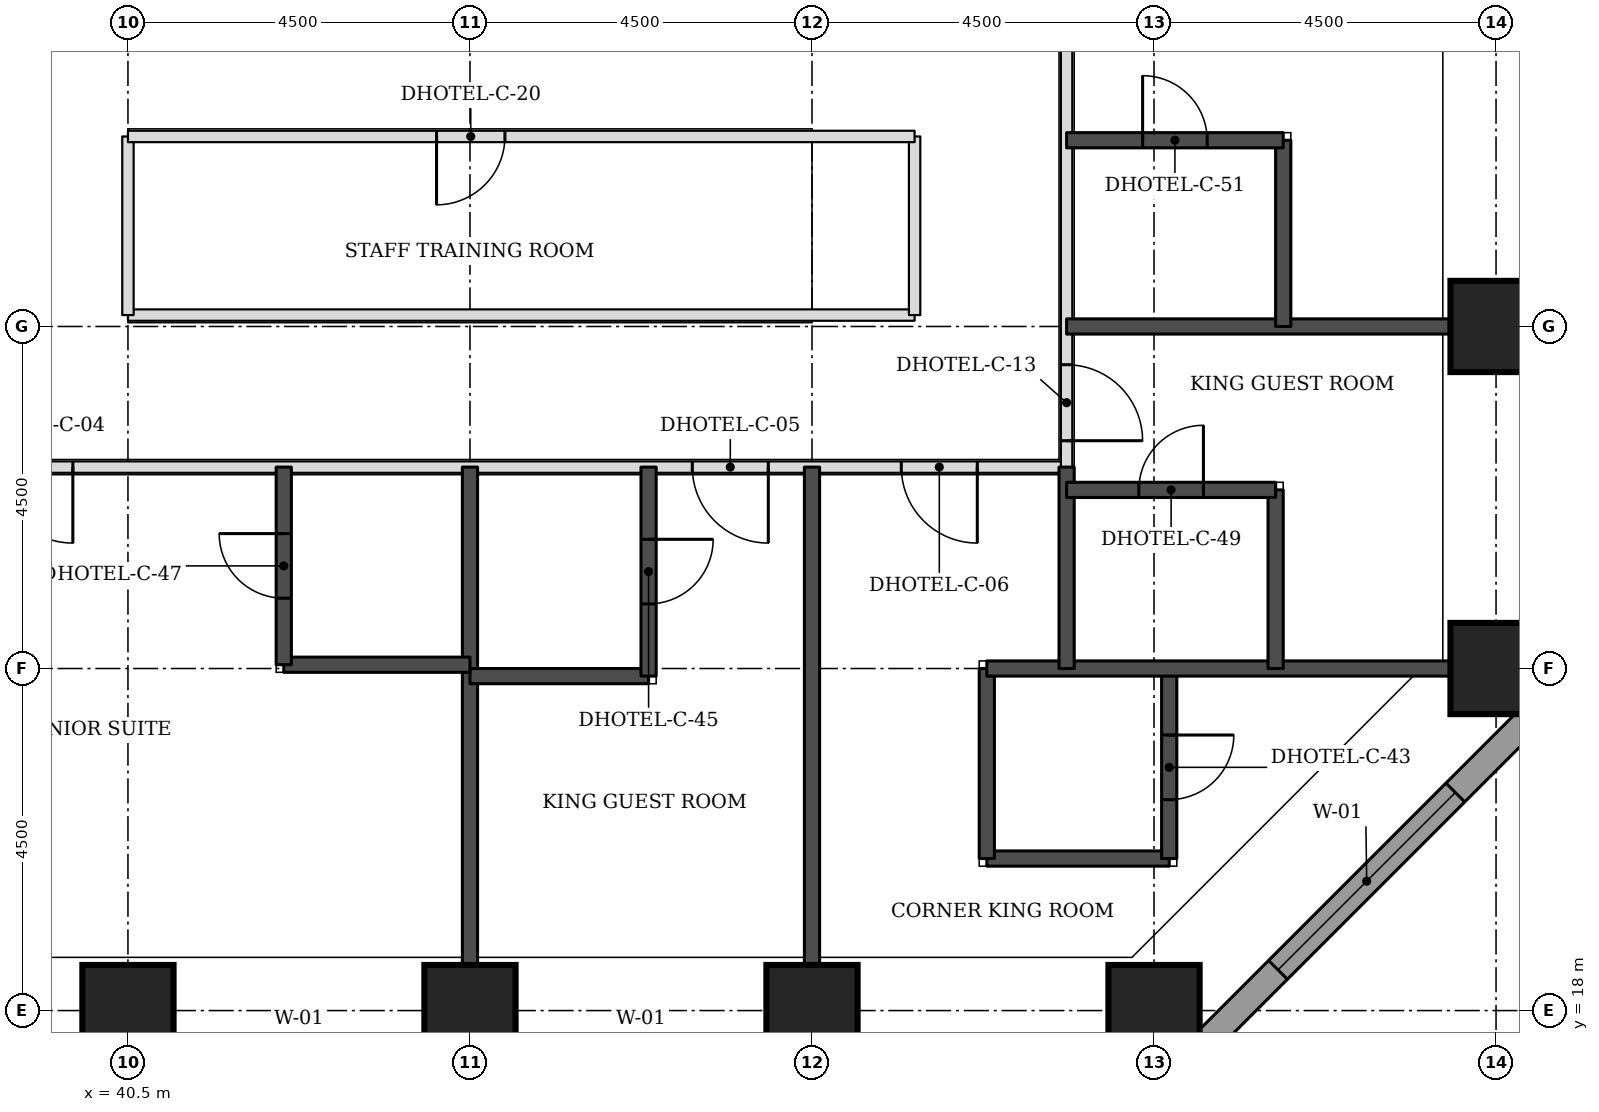
"""IFC4 building model, lengths in metres.
Left out: names, types, materials, properties, quantities, classifications, styles, units other than length and angle.
Written with IfcOpenShell. Run it as: python <this file> out.ifc"""

import sys

from ifc_helpers import new_model, si_unit, direction, frame, frame_2d, origin, origin_2d, place, context, subcontext, project, spatial, rectangle, extrude, element, fill, save


model = new_model("IFC4")
c1 = context("Model", 3, precision=1e-05, world=origin(), true_north=direction((0.0, 1.0)))
c2 = subcontext(c1, "Body", "Model", "MODEL_VIEW")
j1 = project(units=[si_unit("LENGTHUNIT", "METRE"), si_unit("PLANEANGLEUNIT", "RADIAN")], contexts=[c1])
p1 = place(None, origin())
s1 = spatial("IfcSite", under=j1, at=p1, CompositionType="ELEMENT")
p2 = place(p1, origin())
s2 = spatial("IfcBuilding", under=s1, at=p2, CompositionType="ELEMENT")
p3 = place(p2, frame((0.0, 0.0, 33.0)))
s3 = spatial("IfcBuildingStorey", under=s2, at=p3, CompositionType="ELEMENT", Elevation=33.0)
for number, where, z_axis, x_axis in (
    (1, (40.5, 18.0, 0.0), (0.0, 0.0, 1.0), (1.0, 0.0, 0.0)),
    (2, (45.0, 18.0, 0.0), (0.0, 0.0, 1.0), (1.0, 0.0, 0.0)),
    (3, (49.5, 18.0, 0.0), (0.0, 0.0, 1.0), (1.0, 0.0, 0.0)),
    (4, (54.0, 18.0, 0.0), (0.0, 0.0, 1.0), (1.0, 0.0, 0.0)),
    (5, (58.5, 22.5, 0.0), (0.0, 0.0, 1.0), (1.0, 0.0, 0.0)),
    (6, (58.5, 27.0, 0.0), (0.0, 0.0, 1.0), (1.0, 0.0, 0.0)),
):
    element("IfcColumn", number, at=place(p3, frame(where, z_axis=z_axis, x_axis=x_axis)), inside=s3, PredefinedType="COLUMN", context=c2, shape_type="SweptSolid", body=[
        extrude(rectangle(XDim=1.2, YDim=1.2, at=origin_2d()), origin(), (0.0, 0.0, 1.0), 3.3),
    ])
p4 = place(p3, frame((54.27, 17.174, 0.0), z_axis=(0.0, 0.0, 1.0), x_axis=(0.707106781187, 0.707106781187, 0.0)))
e7 = element("IfcWall", 7, at=p4, inside=s3, PredefinedType="STANDARD", context=c2, shape_type="SweptSolid", body=[
    extrude(rectangle(XDim=7.151, YDim=0.35, at=frame_2d((3.576, 0.0))), origin(), (0.0, 0.0, 1.0), 3.055),
])
p5 = place(p4, frame((1.926, 0.0, 0.8)))
e8 = element("IfcOpeningElement", 8, at=p5, cuts=e7, PredefinedType="OPENING", context=c2, shape_type="SweptSolid", body=[
    extrude(rectangle(XDim=3.3, YDim=1.5, at=frame_2d((1.65, 0.75))), frame((0.0, 0.185, 0.0), z_axis=(0.0, -1.0, 0.0), x_axis=(1.0, 0.0, 0.0)), (0.0, 0.0, 1.0), 0.37),
])
p6 = place(p3, frame((19.15, 25.15, 0.0), z_axis=(0.0, 0.0, 1.0), x_axis=(1.0, 0.0, 0.0)))
e9 = element("IfcWall", 9, at=p6, inside=s3, PredefinedType="PARTITIONING", context=c2, shape_type="SweptSolid", body=[
    extrude(rectangle(XDim=33.7, YDim=0.15, at=frame_2d((16.85, 0.0))), origin(), (0.0, 0.0, 1.0), 3.08),
])
p7 = place(p6, frame((4.175, 0.0, 0.0)))
e10 = element("IfcOpeningElement", 10, at=p7, cuts=e9, PredefinedType="OPENING", context=c2, shape_type="SweptSolid", body=[
    extrude(rectangle(XDim=1.0, YDim=2.1, at=frame_2d((0.5, 1.05))), frame((0.0, 0.085, 0.0), z_axis=(0.0, -1.0, 0.0), x_axis=(1.0, 0.0, 0.0)), (0.0, 0.0, 1.0), 0.17),
])
p8 = place(p6, frame((13.325, 0.0, 0.0)))
e11 = element("IfcOpeningElement", 11, at=p8, cuts=e9, PredefinedType="OPENING", context=c2, shape_type="SweptSolid", body=[
    extrude(rectangle(XDim=1.0, YDim=2.1, at=frame_2d((0.5, 1.05))), frame((0.0, 0.085, 0.0), z_axis=(0.0, -1.0, 0.0), x_axis=(1.0, 0.0, 0.0)), (0.0, 0.0, 1.0), 0.17),
])
p9 = place(p6, frame((19.625, 0.0, 0.0)))
e12 = element("IfcOpeningElement", 12, at=p9, cuts=e9, PredefinedType="OPENING", context=c2, shape_type="SweptSolid", body=[
    extrude(rectangle(XDim=1.0, YDim=2.1, at=frame_2d((0.5, 1.05))), frame((0.0, 0.085, 0.0), z_axis=(0.0, -1.0, 0.0), x_axis=(1.0, 0.0, 0.0)), (0.0, 0.0, 1.0), 0.17),
])
p10 = place(p6, frame((28.775, 0.0, 0.0)))
e13 = element("IfcOpeningElement", 13, at=p10, cuts=e9, PredefinedType="OPENING", context=c2, shape_type="SweptSolid", body=[
    extrude(rectangle(XDim=1.0, YDim=2.1, at=frame_2d((0.5, 1.05))), frame((0.0, 0.085, 0.0), z_axis=(0.0, -1.0, 0.0), x_axis=(1.0, 0.0, 0.0)), (0.0, 0.0, 1.0), 0.17),
])
p11 = place(p6, frame((1.175, 0.0, 0.0)))
e14 = element("IfcOpeningElement", 14, at=p11, cuts=e9, PredefinedType="OPENING", context=c2, shape_type="SweptSolid", body=[
    extrude(rectangle(XDim=1.0, YDim=2.1, at=frame_2d((0.5, 1.05))), frame((0.0, 0.085, 0.0), z_axis=(0.0, -1.0, 0.0), x_axis=(1.0, 0.0, 0.0)), (0.0, 0.0, 1.0), 0.17),
])
p12 = place(p6, frame((31.525, 0.0, 0.0)))
e15 = element("IfcOpeningElement", 15, at=p12, cuts=e9, PredefinedType="OPENING", context=c2, shape_type="SweptSolid", body=[
    extrude(rectangle(XDim=1.0, YDim=2.1, at=frame_2d((0.5, 1.05))), frame((0.0, 0.085, 0.0), z_axis=(0.0, -1.0, 0.0), x_axis=(1.0, 0.0, 0.0)), (0.0, 0.0, 1.0), 0.17),
])
p13 = place(p3, frame((52.85, 25.15, 0.0), z_axis=(0.0, 0.0, 1.0), x_axis=(0.0, 1.0, 0.0)))
e16 = element("IfcWall", 16, at=p13, inside=s3, PredefinedType="PARTITIONING", context=c2, shape_type="SweptSolid", body=[
    extrude(rectangle(XDim=22.35, YDim=0.15, at=frame_2d((11.175, 0.0))), origin(), (0.0, 0.0, 1.0), 3.08),
])
p14 = place(p13, frame((0.347, 0.0, 0.0)))
e17 = element("IfcOpeningElement", 17, at=p14, cuts=e16, PredefinedType="OPENING", context=c2, shape_type="SweptSolid", body=[
    extrude(rectangle(XDim=1.0, YDim=2.1, at=frame_2d((0.5, 1.05))), frame((0.0, 0.085, 0.0), z_axis=(0.0, -1.0, 0.0), x_axis=(1.0, 0.0, 0.0)), (0.0, 0.0, 1.0), 0.17),
])
p15 = place(p13, frame((7.075, 0.0, 0.0)))
e18 = element("IfcOpeningElement", 18, at=p15, cuts=e16, PredefinedType="OPENING", context=c2, shape_type="SweptSolid", body=[
    extrude(rectangle(XDim=1.0, YDim=2.1, at=frame_2d((0.5, 1.05))), frame((0.0, 0.085, 0.0), z_axis=(0.0, -1.0, 0.0), x_axis=(1.0, 0.0, 0.0)), (0.0, 0.0, 1.0), 0.17),
])
p16 = place(p13, frame((11.425, 0.0, 0.0)))
e19 = element("IfcOpeningElement", 19, at=p16, cuts=e16, PredefinedType="OPENING", context=c2, shape_type="SweptSolid", body=[
    extrude(rectangle(XDim=1.0, YDim=2.1, at=frame_2d((0.5, 1.05))), frame((0.0, 0.085, 0.0), z_axis=(0.0, -1.0, 0.0), x_axis=(1.0, 0.0, 0.0)), (0.0, 0.0, 1.0), 0.17),
])
p17 = place(p13, frame((17.15, 0.0, 0.0)))
e20 = element("IfcOpeningElement", 20, at=p17, cuts=e16, PredefinedType="OPENING", context=c2, shape_type="SweptSolid", body=[
    extrude(rectangle(XDim=0.9, YDim=2.1, at=frame_2d((0.45, 1.05))), frame((0.0, 0.085, 0.0), z_axis=(0.0, -1.0, 0.0), x_axis=(1.0, 0.0, 0.0)), (0.0, 0.0, 1.0), 0.17),
])
p18 = place(p3, frame((40.5, 27.15, 0.0), z_axis=(0.0, 0.0, 1.0), x_axis=(1.0, 0.0, 0.0)))
e21 = element("IfcWall", 21, at=p18, inside=s3, PredefinedType="PARTITIONING", context=c2, shape_type="SweptSolid", body=[
    extrude(rectangle(XDim=10.35, YDim=0.15, at=frame_2d((5.175, 0.0))), origin(), (0.0, 0.0, 1.0), 3.08),
])
for number, where, z_axis, x_axis in (
    (22, (40.5, 27.15, 0.0), (0.0, 0.0, 1.0), (0.0, 1.0, 0.0)),
    (23, (50.85, 27.15, 0.0), (0.0, 0.0, 1.0), (0.0, 1.0, 0.0)),
):
    element("IfcWall", number, at=place(p3, frame(where, z_axis=z_axis, x_axis=x_axis)), inside=s3, PredefinedType="PARTITIONING", context=c2, shape_type="SweptSolid", body=[
        extrude(rectangle(XDim=2.35, YDim=0.15, at=frame_2d((1.175, 0.0))), origin(), (0.0, 0.0, 1.0), 3.08),
    ])
p19 = place(p3, frame((40.5, 29.5, 0.0), z_axis=(0.0, 0.0, 1.0), x_axis=(1.0, 0.0, 0.0)))
e24 = element("IfcWall", 24, at=p19, inside=s3, PredefinedType="PARTITIONING", context=c2, shape_type="SweptSolid", body=[
    extrude(rectangle(XDim=10.35, YDim=0.15, at=frame_2d((5.175, 0.0))), origin(), (0.0, 0.0, 1.0), 3.08),
])
p20 = place(p19, frame((4.06, 0.0, 0.0)))
e25 = element("IfcOpeningElement", 25, at=p20, cuts=e24, PredefinedType="OPENING", context=c2, shape_type="SweptSolid", body=[
    extrude(rectangle(XDim=0.9, YDim=2.1, at=frame_2d((0.45, 1.05))), frame((0.0, 0.085, 0.0), z_axis=(0.0, -1.0, 0.0), x_axis=(1.0, 0.0, 0.0)), (0.0, 0.0, 1.0), 0.17),
])
for number, where, z_axis, x_axis in (
    (26, (45.0, 18.6, 0.0), (0.0, 0.0, 1.0), (0.0, 1.0, 0.0)),
    (27, (49.5, 18.6, 0.0), (0.0, 0.0, 1.0), (0.0, 1.0, 0.0)),
):
    element("IfcWall", number, at=place(p3, frame(where, z_axis=z_axis, x_axis=x_axis)), inside=s3, PredefinedType="SOLIDWALL", context=c2, shape_type="SweptSolid", body=[
        extrude(rectangle(XDim=6.55, YDim=0.2, at=frame_2d((3.275, 0.0))), origin(), (0.0, 0.0, 1.0), 3.08),
    ])
p21 = place(p3, frame((51.8, 20.0, 0.0), z_axis=(0.0, 0.0, 1.0), x_axis=(1.0, 0.0, 0.0)))
e28 = element("IfcWall", 28, at=p21, inside=s3, PredefinedType="SOLIDWALL", context=c2, shape_type="SweptSolid", body=[
    extrude(rectangle(XDim=2.4, YDim=0.2, at=frame_2d((1.2, 0.0))), origin(), (0.0, 0.0, 1.0), 3.08),
])
p22 = place(p3, frame((51.8, 20.0, 0.0), z_axis=(0.0, 0.0, 1.0), x_axis=(0.0, 1.0, 0.0)))
e29 = element("IfcWall", 29, at=p22, inside=s3, PredefinedType="SOLIDWALL", context=c2, shape_type="SweptSolid", body=[
    extrude(rectangle(XDim=2.5, YDim=0.2, at=frame_2d((1.25, 0.0))), origin(), (0.0, 0.0, 1.0), 3.08),
])
p23 = place(p3, frame((54.2, 20.0, 0.0), z_axis=(0.0, 0.0, 1.0), x_axis=(0.0, 1.0, 0.0)))
e30 = element("IfcWall", 30, at=p23, inside=s3, PredefinedType="SOLIDWALL", context=c2, shape_type="SweptSolid", body=[
    extrude(rectangle(XDim=2.5, YDim=0.2, at=frame_2d((1.25, 0.0))), origin(), (0.0, 0.0, 1.0), 3.08),
])
p24 = place(p23, frame((0.775, 0.0, 0.0)))
e31 = element("IfcOpeningElement", 31, at=p24, cuts=e30, PredefinedType="OPENING", context=c2, shape_type="SweptSolid", body=[
    extrude(rectangle(XDim=0.85, YDim=2.1, at=frame_2d((0.425, 1.05))), frame((0.0, 0.11, 0.0), z_axis=(0.0, -1.0, 0.0), x_axis=(1.0, 0.0, 0.0)), (0.0, 0.0, 1.0), 0.22),
])
p25 = place(p3, frame((45.0, 22.4, 0.0), z_axis=(0.0, 0.0, 1.0), x_axis=(1.0, 0.0, 0.0)))
e32 = element("IfcWall", 32, at=p25, inside=s3, PredefinedType="SOLIDWALL", context=c2, shape_type="SweptSolid", body=[
    extrude(rectangle(XDim=2.35, YDim=0.2, at=frame_2d((1.175, 0.0))), origin(), (0.0, 0.0, 1.0), 3.08),
])
p26 = place(p3, frame((47.35, 22.4, 0.0), z_axis=(0.0, 0.0, 1.0), x_axis=(0.0, 1.0, 0.0)))
e33 = element("IfcWall", 33, at=p26, inside=s3, PredefinedType="SOLIDWALL", context=c2, shape_type="SweptSolid", body=[
    extrude(rectangle(XDim=2.75, YDim=0.2, at=frame_2d((1.375, 0.0))), origin(), (0.0, 0.0, 1.0), 3.08),
])
p27 = place(p26, frame((0.95, 0.0, 0.0)))
e34 = element("IfcOpeningElement", 34, at=p27, cuts=e33, PredefinedType="OPENING", context=c2, shape_type="SweptSolid", body=[
    extrude(rectangle(XDim=0.85, YDim=2.1, at=frame_2d((0.425, 1.05))), frame((0.0, 0.11, 0.0), z_axis=(0.0, -1.0, 0.0), x_axis=(1.0, 0.0, 0.0)), (0.0, 0.0, 1.0), 0.22),
])
p28 = place(p3, frame((51.8, 22.5, 0.0), z_axis=(0.0, 0.0, 1.0), x_axis=(1.0, 0.0, 0.0)))
e35 = element("IfcWall", 35, at=p28, inside=s3, PredefinedType="SOLIDWALL", context=c2, shape_type="SweptSolid", body=[
    extrude(rectangle(XDim=6.1, YDim=0.2, at=frame_2d((3.05, 0.0))), origin(), (0.0, 0.0, 1.0), 3.08),
])
p29 = place(p3, frame((52.85, 22.5, 0.0), z_axis=(0.0, 0.0, 1.0), x_axis=(0.0, 1.0, 0.0)))
e36 = element("IfcWall", 36, at=p29, inside=s3, PredefinedType="SOLIDWALL", context=c2, shape_type="SweptSolid", body=[
    extrude(rectangle(XDim=2.65, YDim=0.2, at=frame_2d((1.325, 0.0))), origin(), (0.0, 0.0, 1.0), 3.08),
])
p30 = place(p3, frame((55.6, 22.5, 0.0), z_axis=(0.0, 0.0, 1.0), x_axis=(0.0, 1.0, 0.0)))
e37 = element("IfcWall", 37, at=p30, inside=s3, PredefinedType="SOLIDWALL", context=c2, shape_type="SweptSolid", body=[
    extrude(rectangle(XDim=2.35, YDim=0.2, at=frame_2d((1.175, 0.0))), origin(), (0.0, 0.0, 1.0), 3.08),
])
p31 = place(p3, frame((42.55, 22.55, 0.0), z_axis=(0.0, 0.0, 1.0), x_axis=(1.0, 0.0, 0.0)))
e38 = element("IfcWall", 38, at=p31, inside=s3, PredefinedType="SOLIDWALL", context=c2, shape_type="SweptSolid", body=[
    extrude(rectangle(XDim=2.45, YDim=0.2, at=frame_2d((1.225, 0.0))), origin(), (0.0, 0.0, 1.0), 3.08),
])
p32 = place(p3, frame((42.55, 22.55, 0.0), z_axis=(0.0, 0.0, 1.0), x_axis=(0.0, 1.0, 0.0)))
e39 = element("IfcWall", 39, at=p32, inside=s3, PredefinedType="SOLIDWALL", context=c2, shape_type="SweptSolid", body=[
    extrude(rectangle(XDim=2.6, YDim=0.2, at=frame_2d((1.3, 0.0))), origin(), (0.0, 0.0, 1.0), 3.08),
])
p33 = place(p32, frame((0.875, 0.0, 0.0)))
e40 = element("IfcOpeningElement", 40, at=p33, cuts=e39, PredefinedType="OPENING", context=c2, shape_type="SweptSolid", body=[
    extrude(rectangle(XDim=0.85, YDim=2.1, at=frame_2d((0.425, 1.05))), frame((0.0, 0.11, 0.0), z_axis=(0.0, -1.0, 0.0), x_axis=(1.0, 0.0, 0.0)), (0.0, 0.0, 1.0), 0.22),
])
p34 = place(p3, frame((52.85, 24.85, 0.0), z_axis=(0.0, 0.0, 1.0), x_axis=(1.0, 0.0, 0.0)))
e41 = element("IfcWall", 41, at=p34, inside=s3, PredefinedType="SOLIDWALL", context=c2, shape_type="SweptSolid", body=[
    extrude(rectangle(XDim=2.75, YDim=0.2, at=frame_2d((1.375, 0.0))), origin(), (0.0, 0.0, 1.0), 3.08),
])
p35 = place(p34, frame((0.95, 0.0, 0.0)))
e42 = element("IfcOpeningElement", 42, at=p35, cuts=e41, PredefinedType="OPENING", context=c2, shape_type="SweptSolid", body=[
    extrude(rectangle(XDim=0.85, YDim=2.1, at=frame_2d((0.425, 1.05))), frame((0.0, 0.11, 0.0), z_axis=(0.0, -1.0, 0.0), x_axis=(1.0, 0.0, 0.0)), (0.0, 0.0, 1.0), 0.22),
])
p36 = place(p3, frame((52.85, 27.0, 0.0), z_axis=(0.0, 0.0, 1.0), x_axis=(1.0, 0.0, 0.0)))
e43 = element("IfcWall", 43, at=p36, inside=s3, PredefinedType="SOLIDWALL", context=c2, shape_type="SweptSolid", body=[
    extrude(rectangle(XDim=5.05, YDim=0.2, at=frame_2d((2.525, 0.0))), origin(), (0.0, 0.0, 1.0), 3.08),
])
p37 = place(p3, frame((55.7, 27.0, 0.0), z_axis=(0.0, 0.0, 1.0), x_axis=(0.0, 1.0, 0.0)))
e44 = element("IfcWall", 44, at=p37, inside=s3, PredefinedType="SOLIDWALL", context=c2, shape_type="SweptSolid", body=[
    extrude(rectangle(XDim=2.45, YDim=0.2, at=frame_2d((1.225, 0.0))), origin(), (0.0, 0.0, 1.0), 3.08),
])
p38 = place(p3, frame((52.85, 29.45, 0.0), z_axis=(0.0, 0.0, 1.0), x_axis=(1.0, 0.0, 0.0)))
e45 = element("IfcWall", 45, at=p38, inside=s3, PredefinedType="SOLIDWALL", context=c2, shape_type="SweptSolid", body=[
    extrude(rectangle(XDim=2.85, YDim=0.2, at=frame_2d((1.425, 0.0))), origin(), (0.0, 0.0, 1.0), 3.08),
])
p39 = place(p38, frame((1.0, 0.0, 0.0)))
e46 = element("IfcOpeningElement", 46, at=p39, cuts=e45, PredefinedType="OPENING", context=c2, shape_type="SweptSolid", body=[
    extrude(rectangle(XDim=0.85, YDim=2.1, at=frame_2d((0.425, 1.05))), frame((0.0, 0.11, 0.0), z_axis=(0.0, -1.0, 0.0), x_axis=(1.0, 0.0, 0.0)), (0.0, 0.0, 1.0), 0.22),
])
p40 = place(p5, origin())
e47 = element("IfcWindow", 47, at=p40, inside=s3, PartitioningType="SINGLE_PANEL", PredefinedType="WINDOW", context=c2, shape_type="SweptSolid", body=[
    extrude(rectangle(XDim=3.3, YDim=1.5, at=frame_2d((1.65, 0.75))), frame((0.0, 0.085, 0.0), z_axis=(0.0, -1.0, 0.0), x_axis=(1.0, 0.0, 0.0)), (0.0, 0.0, 1.0), 0.06),
])
fill(e8, e47)
p41 = place(p9, frame((1.0, 0.0, 0.0), z_axis=(0.0, 0.0, 1.0), x_axis=(-1.0, 0.0, 0.0)))
e48 = element("IfcDoor", 48, at=p41, inside=s3, OperationType="SINGLE_SWING_LEFT", PredefinedType="DOOR", context=c2, shape_type="SweptSolid", body=[
    extrude(rectangle(XDim=1.0, YDim=2.1, at=frame_2d((0.5, 1.05))), frame((0.0, 0.025, 0.0), z_axis=(0.0, -1.0, 0.0), x_axis=(1.0, 0.0, 0.0)), (0.0, 0.0, 1.0), 0.05),
])
fill(e12, e48)
p42 = place(p33, origin())
e49 = element("IfcDoor", 49, at=p42, inside=s3, OperationType="SINGLE_SWING_RIGHT", PredefinedType="DOOR", context=c2, shape_type="SweptSolid", body=[
    extrude(rectangle(XDim=0.85, YDim=2.1, at=frame_2d((0.425, 1.05))), frame((0.0, 0.025, 0.0), z_axis=(0.0, -1.0, 0.0), x_axis=(1.0, 0.0, 0.0)), (0.0, 0.0, 1.0), 0.05),
])
fill(e40, e49)
p43 = place(p10, frame((1.0, 0.0, 0.0), z_axis=(0.0, 0.0, 1.0), x_axis=(-1.0, 0.0, 0.0)))
e50 = element("IfcDoor", 50, at=p43, inside=s3, OperationType="SINGLE_SWING_LEFT", PredefinedType="DOOR", context=c2, shape_type="SweptSolid", body=[
    extrude(rectangle(XDim=1.0, YDim=2.1, at=frame_2d((0.5, 1.05))), frame((0.0, 0.025, 0.0), z_axis=(0.0, -1.0, 0.0), x_axis=(1.0, 0.0, 0.0)), (0.0, 0.0, 1.0), 0.05),
])
fill(e13, e50)
p44 = place(p27, frame((0.85, 0.0, 0.0), z_axis=(0.0, 0.0, 1.0), x_axis=(-1.0, 0.0, 0.0)))
e51 = element("IfcDoor", 51, at=p44, inside=s3, OperationType="SINGLE_SWING_LEFT", PredefinedType="DOOR", context=c2, shape_type="SweptSolid", body=[
    extrude(rectangle(XDim=0.85, YDim=2.1, at=frame_2d((0.425, 1.05))), frame((0.0, 0.025, 0.0), z_axis=(0.0, -1.0, 0.0), x_axis=(1.0, 0.0, 0.0)), (0.0, 0.0, 1.0), 0.05),
])
fill(e34, e51)
p45 = place(p14, frame((1.0, 0.0, 0.0), z_axis=(0.0, 0.0, 1.0), x_axis=(-1.0, 0.0, 0.0)))
e52 = element("IfcDoor", 52, at=p45, inside=s3, OperationType="SINGLE_SWING_RIGHT", PredefinedType="DOOR", context=c2, shape_type="SweptSolid", body=[
    extrude(rectangle(XDim=1.0, YDim=2.1, at=frame_2d((0.5, 1.05))), frame((0.0, 0.025, 0.0), z_axis=(0.0, -1.0, 0.0), x_axis=(1.0, 0.0, 0.0)), (0.0, 0.0, 1.0), 0.05),
])
fill(e17, e52)
p46 = place(p35, origin())
e53 = element("IfcDoor", 53, at=p46, inside=s3, OperationType="SINGLE_SWING_RIGHT", PredefinedType="DOOR", context=c2, shape_type="SweptSolid", body=[
    extrude(rectangle(XDim=0.85, YDim=2.1, at=frame_2d((0.425, 1.05))), frame((0.0, 0.025, 0.0), z_axis=(0.0, -1.0, 0.0), x_axis=(1.0, 0.0, 0.0)), (0.0, 0.0, 1.0), 0.05),
])
fill(e42, e53)
p47 = place(p39, origin())
e54 = element("IfcDoor", 54, at=p47, inside=s3, OperationType="SINGLE_SWING_LEFT", PredefinedType="DOOR", context=c2, shape_type="SweptSolid", body=[
    extrude(rectangle(XDim=0.85, YDim=2.1, at=frame_2d((0.425, 1.05))), frame((0.0, 0.025, 0.0), z_axis=(0.0, -1.0, 0.0), x_axis=(1.0, 0.0, 0.0)), (0.0, 0.0, 1.0), 0.05),
])
fill(e46, e54)
p48 = place(p12, frame((1.0, 0.0, 0.0), z_axis=(0.0, 0.0, 1.0), x_axis=(-1.0, 0.0, 0.0)))
e55 = element("IfcDoor", 55, at=p48, inside=s3, OperationType="SINGLE_SWING_LEFT", PredefinedType="DOOR", context=c2, shape_type="SweptSolid", body=[
    extrude(rectangle(XDim=1.0, YDim=2.1, at=frame_2d((0.5, 1.05))), frame((0.0, 0.025, 0.0), z_axis=(0.0, -1.0, 0.0), x_axis=(1.0, 0.0, 0.0)), (0.0, 0.0, 1.0), 0.05),
])
fill(e15, e55)
p49 = place(p24, frame((0.85, 0.0, 0.0), z_axis=(0.0, 0.0, 1.0), x_axis=(-1.0, 0.0, 0.0)))
e56 = element("IfcDoor", 56, at=p49, inside=s3, OperationType="SINGLE_SWING_LEFT", PredefinedType="DOOR", context=c2, shape_type="SweptSolid", body=[
    extrude(rectangle(XDim=0.85, YDim=2.1, at=frame_2d((0.425, 1.05))), frame((0.0, 0.025, 0.0), z_axis=(0.0, -1.0, 0.0), x_axis=(1.0, 0.0, 0.0)), (0.0, 0.0, 1.0), 0.05),
])
fill(e31, e56)
p50 = place(p20, frame((0.9, 0.0, 0.0), z_axis=(0.0, 0.0, 1.0), x_axis=(-1.0, 0.0, 0.0)))
e57 = element("IfcDoor", 57, at=p50, inside=s3, OperationType="SINGLE_SWING_RIGHT", PredefinedType="DOOR", context=c2, shape_type="SweptSolid", body=[
    extrude(rectangle(XDim=0.9, YDim=2.1, at=frame_2d((0.45, 1.05))), frame((0.0, 0.025, 0.0), z_axis=(0.0, -1.0, 0.0), x_axis=(1.0, 0.0, 0.0)), (0.0, 0.0, 1.0), 0.05),
])
fill(e25, e57)
save(model, sys.argv[1])
